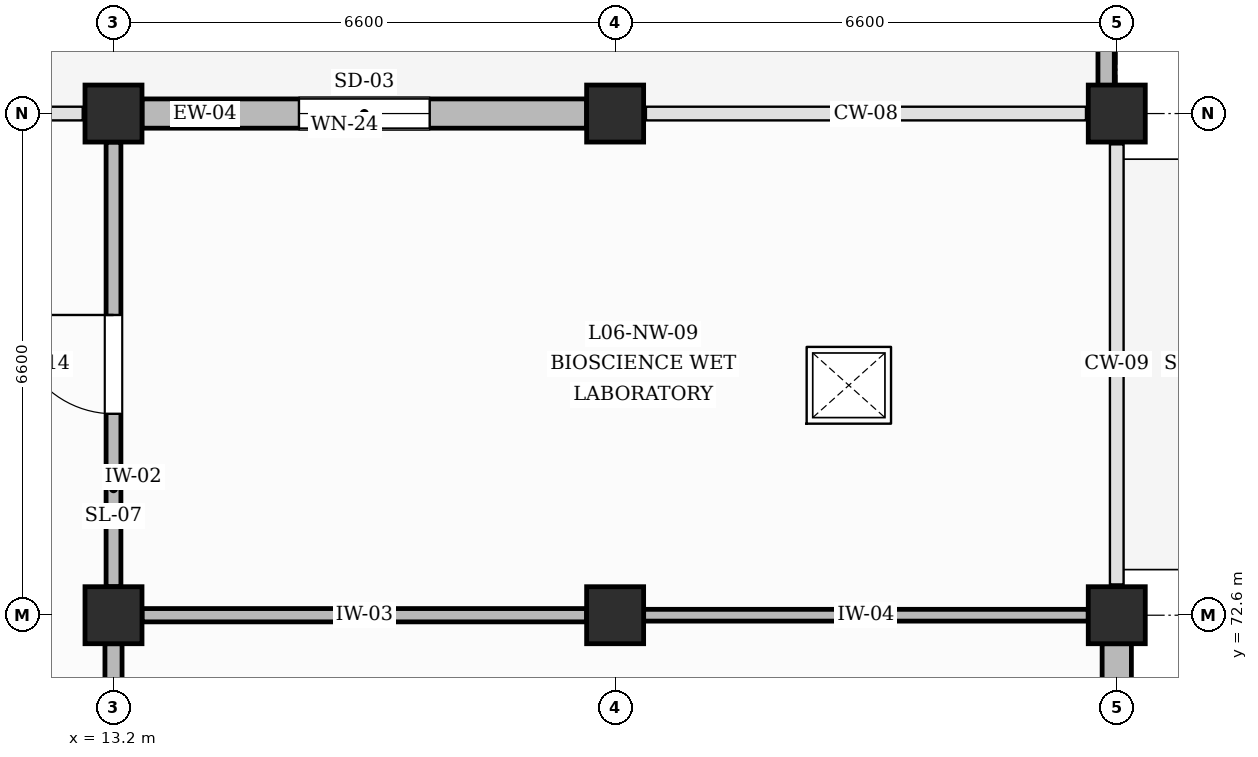
"""IFC4 building model, lengths in metres.
Left out: names, types, materials, properties, quantities, classifications, styles, units other than length and angle.
Written with IfcOpenShell. Run it as: python <this file> out.ifc"""

import sys

from ifc_helpers import new_model, si_unit, direction, frame, frame_2d, origin, origin_2d, place, context, subcontext, project, spatial, rectangle, extrude, element, fill, save


model = new_model("IFC4")
c1 = context("Model", 3, precision=1e-05, world=origin(), true_north=direction((0.0, 1.0)))
c2 = subcontext(c1, "Body", "Model", "MODEL_VIEW")
j1 = project(units=[si_unit("LENGTHUNIT", "METRE"), si_unit("PLANEANGLEUNIT", "RADIAN")], contexts=[c1])
p1 = place(None, origin())
s1 = spatial("IfcSite", under=j1, at=p1, CompositionType="ELEMENT")
p2 = place(p1, origin())
s2 = spatial("IfcBuilding", under=s1, at=p2, CompositionType="ELEMENT")
p3 = place(p2, frame((0.0, 0.0, 27.0)))
s3 = spatial("IfcBuildingStorey", under=s2, at=p3, CompositionType="ELEMENT", Elevation=27.0)
for number, where, z_axis, x_axis in (
    (1, (13.2, 72.6, 0.0), (0.0, 0.0, 1.0), (1.0, 0.0, 0.0)),
    (2, (13.2, 79.2, 0.0), (0.0, 0.0, 1.0), (1.0, 0.0, 0.0)),
    (3, (19.8, 72.6, 0.0), (0.0, 0.0, 1.0), (1.0, 0.0, 0.0)),
    (4, (19.8, 79.2, 0.0), (0.0, 0.0, 1.0), (1.0, 0.0, 0.0)),
    (5, (26.4, 72.6, 0.0), (0.0, 0.0, 1.0), (1.0, 0.0, 0.0)),
    (6, (26.4, 79.2, 0.0), (0.0, 0.0, 1.0), (1.0, 0.0, 0.0)),
):
    element("IfcColumn", number, at=place(p3, frame(where, z_axis=z_axis, x_axis=x_axis)), inside=s3, PredefinedType="COLUMN", context=c2, shape_type="SweptSolid", body=[
        extrude(rectangle(XDim=0.75, YDim=0.75, at=origin_2d()), origin(), (0.0, 0.0, 1.0), 4.2),
    ])
p4 = place(p3, frame((13.575, 79.2, 0.0), z_axis=(0.0, 0.0, 1.0), x_axis=(1.0, 0.0, 0.0)))
e7 = element("IfcWall", 7, at=p4, inside=s3, PredefinedType="SOLIDWALL", context=c2, shape_type="SweptSolid", body=[
    extrude(rectangle(XDim=5.85, YDim=0.385, at=frame_2d((2.925, 0.0))), origin(), (0.0, 0.0, 1.0), 3.27),
])
p5 = place(p4, frame((2.065, 0.0, 0.95)))
e8 = element("IfcOpeningElement", 8, at=p5, cuts=e7, PredefinedType="OPENING", context=c2, shape_type="SweptSolid", body=[
    extrude(rectangle(XDim=1.72, YDim=1.96, at=frame_2d((0.86, 0.98))), frame((0.0, 0.202, 0.0), z_axis=(0.0, -1.0, 0.0), x_axis=(1.0, 0.0, 0.0)), (0.0, 0.0, 1.0), 0.405),
])
p6 = place(p3, frame((26.4, 66.375, 0.0), z_axis=(0.0, 0.0, 1.0), x_axis=(0.0, 1.0, 0.0)))
e9 = element("IfcWall", 9, at=p6, inside=s3, PredefinedType="SOLIDWALL", context=c2, shape_type="SweptSolid", body=[
    extrude(rectangle(XDim=5.85, YDim=0.385, at=frame_2d((2.925, 0.0))), origin(), (0.0, 0.0, 1.0), 3.27),
])
p7 = place(p6, frame((1.945, 0.0, 0.95)))
e10 = element("IfcOpeningElement", 10, at=p7, cuts=e9, PredefinedType="OPENING", context=c2, shape_type="SweptSolid", body=[
    extrude(rectangle(XDim=1.96, YDim=1.74, at=frame_2d((0.98, 0.87))), frame((0.0, 0.202, 0.0), z_axis=(0.0, -1.0, 0.0), x_axis=(1.0, 0.0, 0.0)), (0.0, 0.0, 1.0), 0.405),
])
p8 = place(p3, frame((26.26, 79.5, 0.0), z_axis=(0.0, 0.0, 1.0), x_axis=(0.0, 1.0, 0.0)))
e11 = element("IfcWall", 11, at=p8, inside=s3, PredefinedType="PARAPET", context=c2, shape_type="SweptSolid", body=[
    extrude(rectangle(XDim=6.0, YDim=0.215, at=frame_2d((3.0, 0.0))), origin(), (0.0, 0.0, 1.0), 1.15),
])
p9 = place(p3, frame((13.2, 66.375, 0.0), z_axis=(0.0, 0.0, 1.0), x_axis=(0.0, 1.0, 0.0)))
e12 = element("IfcWall", 12, at=p9, inside=s3, PredefinedType="PARTITIONING", context=c2, shape_type="SweptSolid", body=[
    extrude(rectangle(XDim=5.85, YDim=0.225, at=frame_2d((2.925, 0.0))), origin(), (0.0, 0.0, 1.0), 3.17),
])
p10 = place(p9, frame((2.365, 0.0, 0.0)))
e13 = element("IfcOpeningElement", 13, at=p10, cuts=e12, PredefinedType="OPENING", context=c2, shape_type="SweptSolid", body=[
    extrude(rectangle(XDim=1.12, YDim=2.2, at=frame_2d((0.56, 1.1))), frame((0.0, 0.123, 0.0), z_axis=(0.0, -1.0, 0.0), x_axis=(1.0, 0.0, 0.0)), (0.0, 0.0, 1.0), 0.245),
])
p11 = place(p3, frame((13.2, 72.975, 0.0), z_axis=(0.0, 0.0, 1.0), x_axis=(0.0, 1.0, 0.0)))
e14 = element("IfcWall", 14, at=p11, inside=s3, PredefinedType="PARTITIONING", context=c2, shape_type="SweptSolid", body=[
    extrude(rectangle(XDim=5.85, YDim=0.195, at=frame_2d((2.925, 0.0))), origin(), (0.0, 0.0, 1.0), 3.17),
])
p12 = place(p11, frame((2.275, 0.0, 0.0)))
e15 = element("IfcOpeningElement", 15, at=p12, cuts=e14, PredefinedType="OPENING", context=c2, shape_type="SweptSolid", body=[
    extrude(rectangle(XDim=1.3, YDim=2.3, at=frame_2d((0.65, 1.15))), frame((0.0, 0.107, 0.0), z_axis=(0.0, -1.0, 0.0), x_axis=(1.0, 0.0, 0.0)), (0.0, 0.0, 1.0), 0.215),
])
p13 = place(p3, frame((13.575, 72.6, 0.0), z_axis=(0.0, 0.0, 1.0), x_axis=(1.0, 0.0, 0.0)))
e16 = element("IfcWall", 16, at=p13, inside=s3, PredefinedType="PARTITIONING", context=c2, shape_type="SweptSolid", body=[
    extrude(rectangle(XDim=5.85, YDim=0.175, at=frame_2d((2.925, 0.0))), origin(), (0.0, 0.0, 1.0), 3.17),
])
p14 = place(p3, frame((20.175, 72.6, 0.0), z_axis=(0.0, 0.0, 1.0), x_axis=(1.0, 0.0, 0.0)))
e17 = element("IfcWall", 17, at=p14, inside=s3, PredefinedType="PARTITIONING", context=c2, shape_type="SweptSolid", body=[
    extrude(rectangle(XDim=5.85, YDim=0.155, at=frame_2d((2.925, 0.0))), origin(), (0.0, 0.0, 1.0), 3.17),
])
p15 = place(p5, origin())
e18 = element("IfcWindow", 18, at=p15, inside=s3, PartitioningType="DOUBLE_PANEL_VERTICAL", PredefinedType="WINDOW", context=c2, shape_type="SweptSolid", body=[
    extrude(rectangle(XDim=1.72, YDim=1.96, at=frame_2d((0.86, 0.98))), frame((0.0, 0.03, 0.0), z_axis=(0.0, -1.0, 0.0), x_axis=(1.0, 0.0, 0.0)), (0.0, 0.0, 1.0), 0.06),
])
fill(e8, e18)
p16 = place(p12, origin())
e19 = element("IfcDoor", 19, at=p16, inside=s3, OperationType="SINGLE_SWING_RIGHT", PredefinedType="DOOR", context=c2, shape_type="SweptSolid", body=[
    extrude(rectangle(XDim=1.3, YDim=2.3, at=frame_2d((0.65, 1.15))), frame((0.0, 0.025, 0.0), z_axis=(0.0, -1.0, 0.0), x_axis=(1.0, 0.0, 0.0)), (0.0, 0.0, 1.0), 0.05),
])
fill(e15, e19)
save(model, sys.argv[1])
